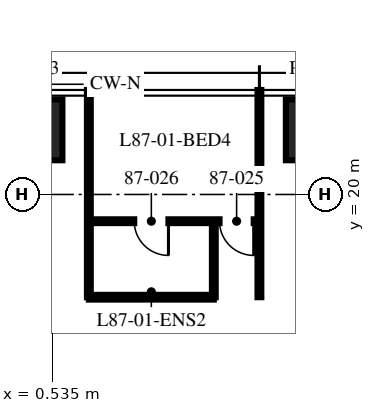
"""IFC4 building model, lengths in metres.
Left out: names, types, materials, properties, quantities, classifications, styles, units other than length and angle.
Written with IfcOpenShell. Run it as: python <this file> out.ifc"""

import sys

from ifc_helpers import new_model, si_unit, direction, frame, frame_2d, origin, origin_2d, place, context, subcontext, project, spatial, rectangle, extrude, element, fill, save


model = new_model("IFC4")
c1 = context("Model", 3, precision=1e-05, world=origin(), true_north=direction((0.0, 1.0)))
c2 = subcontext(c1, "Body", "Model", "MODEL_VIEW")
j1 = project(units=[si_unit("LENGTHUNIT", "METRE"), si_unit("PLANEANGLEUNIT", "RADIAN")], contexts=[c1])
p1 = place(None, origin())
s1 = spatial("IfcSite", under=j1, at=p1, CompositionType="ELEMENT")
p2 = place(p1, origin())
s2 = spatial("IfcBuilding", under=s1, at=p2, CompositionType="ELEMENT")
p3 = place(p2, frame((0.0, 0.0, 345.75)))
s3 = spatial("IfcBuildingStorey", under=s2, at=p3, CompositionType="ELEMENT", Elevation=345.75)
for number, where, z_axis, x_axis in (
    (1, (0.0, 21.7, 0.0), (0.0, 0.0, 1.0), (1.0, 0.0, 0.0)),
    (2, (7.48, 21.7, 0.0), (0.0, 0.0, 1.0), (1.0, 0.0, 0.0)),
):
    element("IfcColumn", number, at=place(p3, frame(where, z_axis=z_axis, x_axis=x_axis)), inside=s3, PredefinedType="COLUMN", context=c2, shape_type="SweptSolid", body=[
        extrude(rectangle(XDim=1.6, YDim=1.6, at=origin_2d()), origin(), (0.0, 0.0, 1.0), 3.75),
    ])
for number, where, z_axis, x_axis in (
    (3, (5.984, 17.296, 0.0), (0.0, 0.0, 1.0), (0.0, 1.0, 0.0)),
    (4, (1.496, 17.296, 0.0), (0.0, 0.0, 1.0), (0.0, 1.0, 0.0)),
):
    element("IfcWall", number, at=place(p3, frame(where, z_axis=z_axis, x_axis=x_axis)), inside=s3, PredefinedType="PARTITIONING", context=c2, shape_type="SweptSolid", body=[
        extrude(rectangle(XDim=5.454, YDim=0.1, at=frame_2d((2.727, 0.0))), origin(), (0.0, 0.0, 1.0), 2.91),
    ])
p4 = place(p3, frame((5.984, 19.296, 0.0), z_axis=(0.0, 0.0, 1.0), x_axis=(-1.0, 0.0, 0.0)))
e5 = element("IfcWall", 5, at=p4, inside=s3, PredefinedType="PARTITIONING", context=c2, shape_type="SweptSolid", body=[
    extrude(rectangle(XDim=4.488, YDim=0.1, at=frame_2d((2.244, 0.0))), origin(), (0.0, 0.0, 1.0), 2.81),
])
p5 = place(p4, frame((0.15, 0.0, 0.0)))
e6 = element("IfcOpeningElement", 6, at=p5, cuts=e5, PredefinedType="OPENING", context=c2, shape_type="SweptSolid", body=[
    extrude(rectangle(XDim=0.9, YDim=2.1, at=frame_2d((0.45, 1.05))), frame((0.0, 0.06, 0.0), z_axis=(0.0, -1.0, 0.0), x_axis=(1.0, 0.0, 0.0)), (0.0, 0.0, 1.0), 0.12),
])
p6 = place(p4, frame((2.394, 0.0, 0.0)))
e7 = element("IfcOpeningElement", 7, at=p6, cuts=e5, PredefinedType="OPENING", context=c2, shape_type="SweptSolid", body=[
    extrude(rectangle(XDim=0.9, YDim=2.1, at=frame_2d((0.45, 1.05))), frame((0.0, 0.06, 0.0), z_axis=(0.0, -1.0, 0.0), x_axis=(1.0, 0.0, 0.0)), (0.0, 0.0, 1.0), 0.12),
])
p7 = place(p3, frame((4.784, 17.296, 0.0), z_axis=(0.0, 0.0, 1.0), x_axis=(0.0, 1.0, 0.0)))
e8 = element("IfcWall", 8, at=p7, inside=s3, PredefinedType="PARTITIONING", context=c2, shape_type="SweptSolid", body=[
    extrude(rectangle(XDim=2.0, YDim=0.1, at=frame_2d((1.0, 0.0))), origin(), (0.0, 0.0, 1.0), 3.5),
])
p8 = place(p3, frame((4.784, 17.296, 0.0), z_axis=(0.0, 0.0, 1.0), x_axis=(-1.0, 0.0, 0.0)))
e9 = element("IfcWall", 9, at=p8, inside=s3, PredefinedType="PARTITIONING", context=c2, shape_type="SweptSolid", body=[
    extrude(rectangle(XDim=3.288, YDim=0.125, at=frame_2d((1.644, 0.0))), origin(), (0.0, 0.0, 1.0), 2.81),
])
p9 = place(p5, origin())
e10 = element("IfcDoor", 10, at=p9, inside=s3, OperationType="SINGLE_SWING_LEFT", PredefinedType="DOOR", context=c2, shape_type="SweptSolid", body=[
    extrude(rectangle(XDim=0.9, YDim=2.1, at=frame_2d((0.45, 1.05))), frame((0.0, 0.025, 0.0), z_axis=(0.0, -1.0, 0.0), x_axis=(1.0, 0.0, 0.0)), (0.0, 0.0, 1.0), 0.05),
])
fill(e6, e10)
p10 = place(p6, origin())
e11 = element("IfcDoor", 11, at=p10, inside=s3, OperationType="SINGLE_SWING_LEFT", PredefinedType="DOOR", context=c2, shape_type="SweptSolid", body=[
    extrude(rectangle(XDim=0.9, YDim=2.1, at=frame_2d((0.45, 1.05))), frame((0.0, 0.025, 0.0), z_axis=(0.0, -1.0, 0.0), x_axis=(1.0, 0.0, 0.0)), (0.0, 0.0, 1.0), 0.05),
])
fill(e7, e11)
save(model, sys.argv[1])
